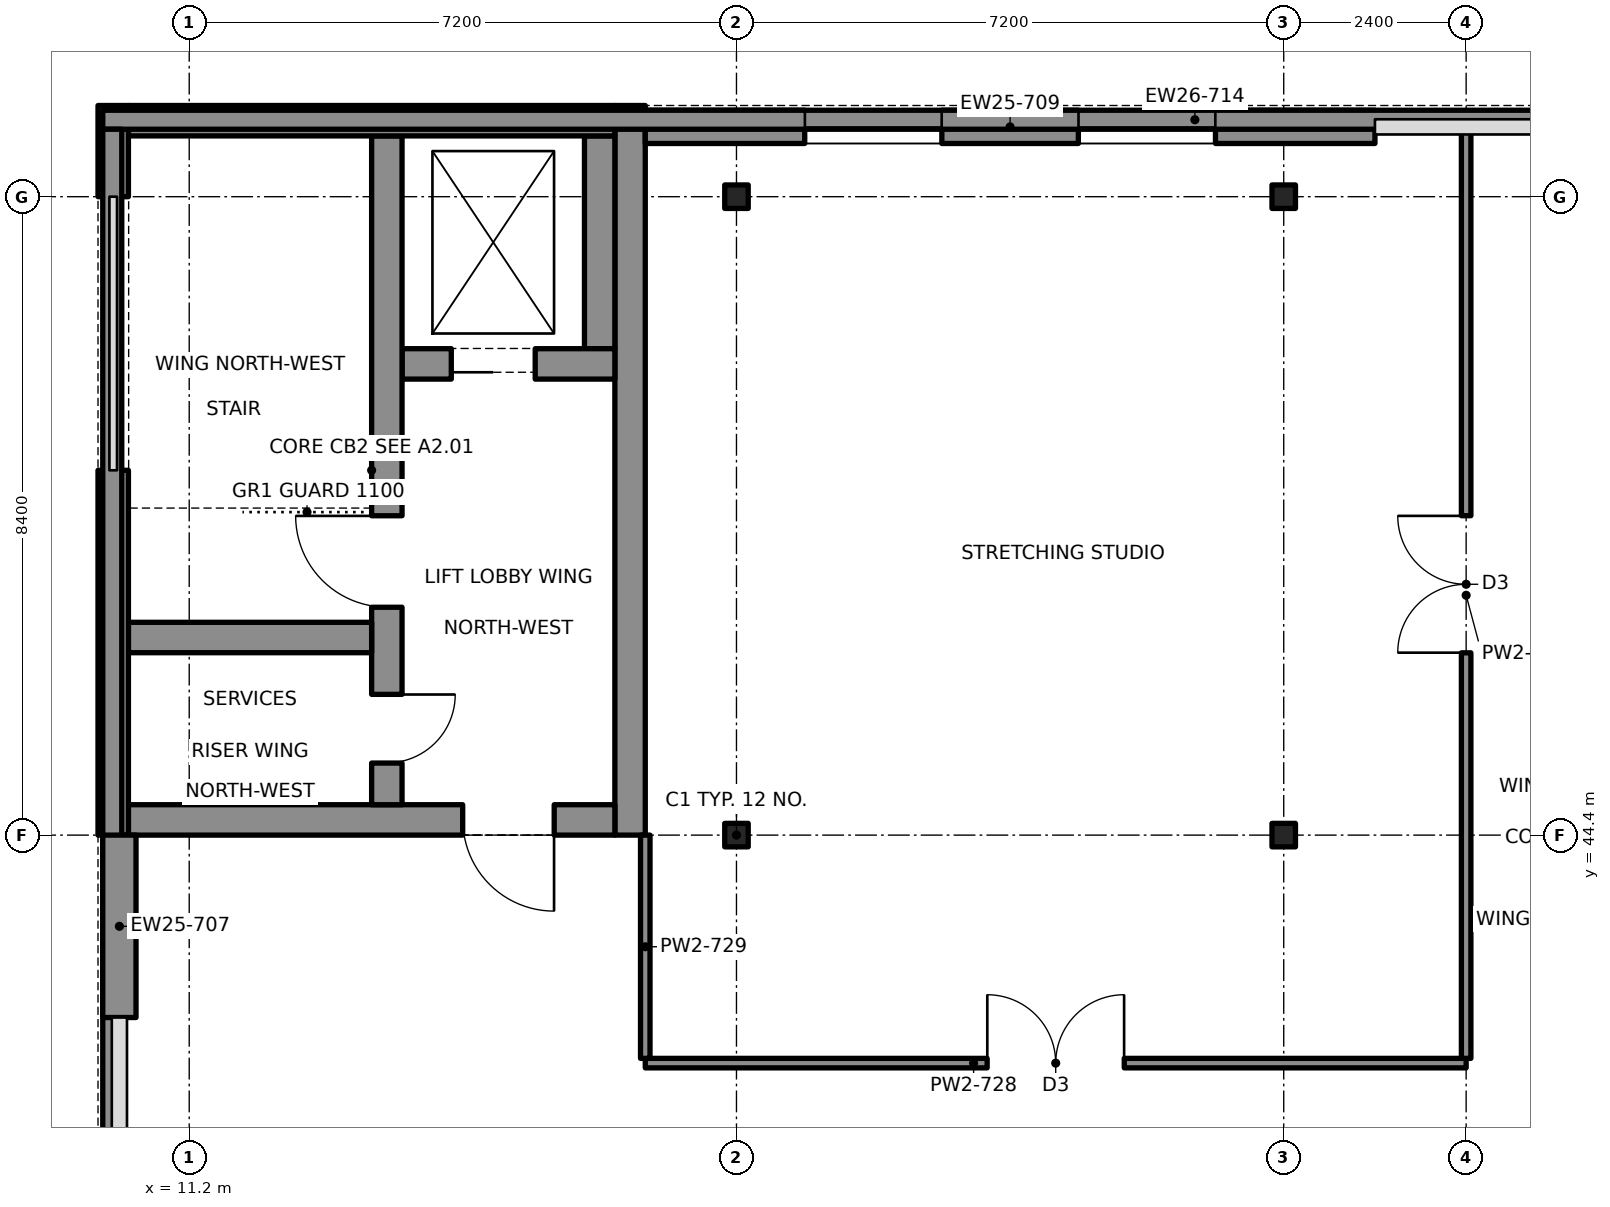
"""IFC4 building model, lengths in metres.
Left out: names, types, materials, properties, quantities, classifications, styles, units other than length and angle.
Written with IfcOpenShell. Run it as: python <this file> out.ifc"""

import sys

from ifc_helpers import new_model, si_unit, direction, frame, frame_2d, origin, origin_2d, place, context, subcontext, project, spatial, rectangle, i_section, extrude, element, fill, save


model = new_model("IFC4")
c1 = context("Model", 3, precision=1e-05, world=origin(), true_north=direction((0.0, 1.0)))
c2 = subcontext(c1, "Body", "Model", "MODEL_VIEW")
j1 = project(units=[si_unit("LENGTHUNIT", "METRE"), si_unit("PLANEANGLEUNIT", "RADIAN")], contexts=[c1])
p1 = place(None, origin())
s1 = spatial("IfcSite", under=j1, at=p1, CompositionType="ELEMENT")
p2 = place(p1, origin())
s2 = spatial("IfcBuilding", under=s1, at=p2, CompositionType="ELEMENT")
p3 = place(p2, frame((0.0, 0.0, 14.0)))
s3 = spatial("IfcBuildingStorey", under=s2, at=p3, CompositionType="ELEMENT", Elevation=14.0)
for number, where, z_axis, x_axis in (
    (1, (18.4, 44.4, 0.0), (0.0, 0.0, 1.0), (1.0, 0.0, 0.0)),
    (2, (18.4, 52.8, 0.0), (0.0, 0.0, 1.0), (1.0, 0.0, 0.0)),
    (3, (25.6, 44.4, 0.0), (0.0, 0.0, 1.0), (1.0, 0.0, 0.0)),
    (4, (25.6, 52.8, 0.0), (0.0, 0.0, 1.0), (1.0, 0.0, 0.0)),
):
    element("IfcColumn", number, at=place(p3, frame(where, z_axis=z_axis, x_axis=x_axis)), inside=s3, PredefinedType="COLUMN", context=c2, shape_type="SweptSolid", body=[
        extrude(i_section(OverallWidth=0.309, OverallDepth=0.323, WebThickness=0.014, FlangeThickness=0.023, at=origin_2d()), origin(), (0.0, 0.0, 1.0), 4.4),
    ])
p4 = place(p3, frame((17.2, 53.719, 0.0), z_axis=(0.0, 0.0, 1.0), x_axis=(1.0, 0.0, 0.0)))
e5 = element("IfcWall", 5, at=p4, inside=s3, PredefinedType="SOLIDWALL", context=c2, shape_type="SweptSolid", body=[
    extrude(rectangle(XDim=9.6, YDim=0.438, at=frame_2d((4.8, 0.0))), origin(), (0.0, 0.0, 1.0), 4.4),
])
p5 = place(p4, frame((2.1, 0.0, 0.75)))
e6 = element("IfcOpeningElement", 6, at=p5, cuts=e5, PredefinedType="OPENING", context=c2, shape_type="SweptSolid", body=[
    extrude(rectangle(XDim=1.8, YDim=2.8, at=frame_2d((0.9, 1.4))), frame((0.0, 0.229, 0.0), z_axis=(0.0, -1.0, 0.0), x_axis=(1.0, 0.0, 0.0)), (0.0, 0.0, 1.0), 0.458),
])
p6 = place(p4, frame((5.7, 0.0, 0.75)))
e7 = element("IfcOpeningElement", 7, at=p6, cuts=e5, PredefinedType="OPENING", context=c2, shape_type="SweptSolid", body=[
    extrude(rectangle(XDim=1.8, YDim=2.8, at=frame_2d((0.9, 1.4))), frame((0.0, 0.229, 0.0), z_axis=(0.0, -1.0, 0.0), x_axis=(1.0, 0.0, 0.0)), (0.0, 0.0, 1.0), 0.458),
])
p7 = place(p3, frame((10.281, 42.0, 0.0), z_axis=(0.0, 0.0, 1.0), x_axis=(0.0, 1.0, 0.0)))
e8 = element("IfcWall", 8, at=p7, inside=s3, PredefinedType="SOLIDWALL", context=c2, shape_type="SweptSolid", body=[
    extrude(rectangle(XDim=2.4, YDim=0.438, at=frame_2d((1.2, 0.0))), origin(), (0.0, 0.0, 1.0), 4.4),
])
p8 = place(p3, frame((10.062, 53.812, 4.4), z_axis=(0.0, 0.0, 1.0), x_axis=(1.0, 0.0, 0.0)))
e9 = element("IfcWall", 9, at=p8, inside=s3, PredefinedType="PARAPET", context=c2, shape_type="SweptSolid", body=[
    extrude(rectangle(XDim=28.738, YDim=0.25, at=frame_2d((14.369, 0.0))), origin(), (0.0, 0.0, 1.0), 1.1),
])
p9 = place(p3, frame((10.188, 18.312, 4.4), z_axis=(0.0, 0.0, 1.0), x_axis=(0.0, 1.0, 0.0)))
e10 = element("IfcWall", 10, at=p9, inside=s3, PredefinedType="PARAPET", context=c2, shape_type="SweptSolid", body=[
    extrude(rectangle(XDim=35.375, YDim=0.25, at=frame_2d((17.688, 0.0))), origin(), (0.0, 0.0, 1.0), 1.1),
])
p10 = place(p3, frame((10.2, 44.4, 0.0), z_axis=(0.0, 0.0, 1.0), x_axis=(0.0, 1.0, 0.0)))
e11 = element("IfcWall", 11, at=p10, inside=s3, PredefinedType="SHEAR", context=c2, shape_type="SweptSolid", body=[
    extrude(rectangle(XDim=4.8, YDim=0.4, at=frame_2d((2.4, 0.0))), origin(), (0.0, 0.0, 1.0), 4.2),
])
p11 = place(p3, frame((10.2, 52.8, 0.0), z_axis=(0.0, 0.0, 1.0), x_axis=(0.0, 1.0, 0.0)))
e12 = element("IfcWall", 12, at=p11, inside=s3, PredefinedType="SHEAR", context=c2, shape_type="SweptSolid", body=[
    extrude(rectangle(XDim=1.2, YDim=0.4, at=frame_2d((0.6, 0.0))), origin(), (0.0, 0.0, 1.0), 4.2),
])
p12 = place(p3, frame((17.0, 44.4, 0.0), z_axis=(0.0, 0.0, 1.0), x_axis=(0.0, 1.0, 0.0)))
e13 = element("IfcWall", 13, at=p12, inside=s3, PredefinedType="SHEAR", context=c2, shape_type="SweptSolid", body=[
    extrude(rectangle(XDim=9.6, YDim=0.4, at=frame_2d((4.8, 0.0))), origin(), (0.0, 0.0, 1.0), 4.2),
])
p13 = place(p3, frame((10.4, 53.8, 0.0), z_axis=(0.0, 0.0, 1.0), x_axis=(1.0, 0.0, 0.0)))
e14 = element("IfcWall", 14, at=p13, inside=s3, PredefinedType="SHEAR", context=c2, shape_type="SweptSolid", body=[
    extrude(rectangle(XDim=6.4, YDim=0.4, at=frame_2d((3.2, 0.0))), origin(), (0.0, 0.0, 1.0), 4.2),
])
p14 = place(p3, frame((10.4, 44.6, 0.0), z_axis=(0.0, 0.0, 1.0), x_axis=(1.0, 0.0, 0.0)))
e15 = element("IfcWall", 15, at=p14, inside=s3, PredefinedType="SHEAR", context=c2, shape_type="SweptSolid", body=[
    extrude(rectangle(XDim=6.4, YDim=0.4, at=frame_2d((3.2, 0.0))), origin(), (0.0, 0.0, 1.0), 4.2),
])
p15 = place(p14, frame((4.4, 0.0, 0.0)))
e16 = element("IfcOpeningElement", 16, at=p15, cuts=e15, PredefinedType="OPENING", context=c2, shape_type="SweptSolid", body=[
    extrude(rectangle(XDim=1.2, YDim=2.1, at=frame_2d((0.6, 1.05))), frame((0.0, 0.21, 0.0), z_axis=(0.0, -1.0, 0.0), x_axis=(1.0, 0.0, 0.0)), (0.0, 0.0, 1.0), 0.42),
])
p16 = place(p3, frame((13.8, 44.8, 0.0), z_axis=(0.0, 0.0, 1.0), x_axis=(0.0, 1.0, 0.0)))
e17 = element("IfcWall", 17, at=p16, inside=s3, PredefinedType="SHEAR", context=c2, shape_type="SweptSolid", body=[
    extrude(rectangle(XDim=8.8, YDim=0.4, at=frame_2d((4.4, 0.0))), origin(), (0.0, 0.0, 1.0), 4.2),
])
p17 = place(p16, frame((2.6, 0.0, 0.0)))
e18 = element("IfcOpeningElement", 18, at=p17, cuts=e17, PredefinedType="OPENING", context=c2, shape_type="SweptSolid", body=[
    extrude(rectangle(XDim=1.2, YDim=2.1, at=frame_2d((0.6, 1.05))), frame((0.0, 0.21, 0.0), z_axis=(0.0, -1.0, 0.0), x_axis=(1.0, 0.0, 0.0)), (0.0, 0.0, 1.0), 0.42),
])
p18 = place(p16, frame((0.55, 0.0, 0.0)))
e19 = element("IfcOpeningElement", 19, at=p18, cuts=e17, PredefinedType="OPENING", context=c2, shape_type="SweptSolid", body=[
    extrude(rectangle(XDim=0.9, YDim=2.1, at=frame_2d((0.45, 1.05))), frame((0.0, 0.21, 0.0), z_axis=(0.0, -1.0, 0.0), x_axis=(1.0, 0.0, 0.0)), (0.0, 0.0, 1.0), 0.42),
])
p19 = place(p3, frame((10.4, 47.0, 0.0), z_axis=(0.0, 0.0, 1.0), x_axis=(1.0, 0.0, 0.0)))
e20 = element("IfcWall", 20, at=p19, inside=s3, PredefinedType="SHEAR", context=c2, shape_type="SweptSolid", body=[
    extrude(rectangle(XDim=3.2, YDim=0.4, at=frame_2d((1.6, 0.0))), origin(), (0.0, 0.0, 1.0), 4.2),
])
p20 = place(p3, frame((14.0, 50.6, 0.0), z_axis=(0.0, 0.0, 1.0), x_axis=(1.0, 0.0, 0.0)))
e21 = element("IfcWall", 21, at=p20, inside=s3, PredefinedType="SHEAR", context=c2, shape_type="SweptSolid", body=[
    extrude(rectangle(XDim=2.8, YDim=0.4, at=frame_2d((1.4, 0.0))), origin(), (0.0, 0.0, 1.0), 4.2),
])
p21 = place(p20, frame((0.65, 0.0, 0.0)))
e22 = element("IfcOpeningElement", 22, at=p21, cuts=e21, PredefinedType="OPENING", context=c2, shape_type="SweptSolid", body=[
    extrude(rectangle(XDim=1.1, YDim=2.1, at=frame_2d((0.55, 1.05))), frame((0.0, 0.21, 0.0), z_axis=(0.0, -1.0, 0.0), x_axis=(1.0, 0.0, 0.0)), (0.0, 0.0, 1.0), 0.42),
])
p22 = place(p3, frame((16.6, 50.8, 0.0), z_axis=(0.0, 0.0, 1.0), x_axis=(0.0, 1.0, 0.0)))
e23 = element("IfcWall", 23, at=p22, inside=s3, PredefinedType="SHEAR", context=c2, shape_type="SweptSolid", body=[
    extrude(rectangle(XDim=2.8, YDim=0.4, at=frame_2d((1.4, 0.0))), origin(), (0.0, 0.0, 1.0), 4.2),
])
p23 = place(p3, frame((17.2, 41.4, 0.0), z_axis=(0.0, 0.0, 1.0), x_axis=(1.0, 0.0, 0.0)))
e24 = element("IfcWall", 24, at=p23, inside=s3, PredefinedType="PARTITIONING", context=c2, shape_type="SweptSolid", body=[
    extrude(rectangle(XDim=10.8, YDim=0.125, at=frame_2d((5.4, 0.0))), origin(), (0.0, 0.0, 1.0), 3.65),
])
p24 = place(p23, frame((4.5, 0.0, 0.0)))
e25 = element("IfcOpeningElement", 25, at=p24, cuts=e24, PredefinedType="OPENING", context=c2, shape_type="SweptSolid", body=[
    extrude(rectangle(XDim=1.8, YDim=2.1, at=frame_2d((0.9, 1.05))), frame((0.0, 0.073, 0.0), z_axis=(0.0, -1.0, 0.0), x_axis=(1.0, 0.0, 0.0)), (0.0, 0.0, 1.0), 0.145),
])
p25 = place(p3, frame((17.2, 41.462, 0.0), z_axis=(0.0, 0.0, 1.0), x_axis=(0.0, 1.0, 0.0)))
e26 = element("IfcWall", 26, at=p25, inside=s3, PredefinedType="PARTITIONING", context=c2, shape_type="SweptSolid", body=[
    extrude(rectangle(XDim=2.938, YDim=0.125, at=frame_2d((1.469, 0.0))), origin(), (0.0, 0.0, 1.0), 3.65),
])
p26 = place(p3, frame((28.0, 41.462, 0.0), z_axis=(0.0, 0.0, 1.0), x_axis=(0.0, 1.0, 0.0)))
e27 = element("IfcWall", 27, at=p26, inside=s3, PredefinedType="PARTITIONING", context=c2, shape_type="SweptSolid", body=[
    extrude(rectangle(XDim=12.186, YDim=0.125, at=frame_2d((6.093, 0.0))), origin(), (0.0, 0.0, 1.0), 3.65),
])
p27 = place(p26, frame((5.338, 0.0, 0.0)))
e28 = element("IfcOpeningElement", 28, at=p27, cuts=e27, PredefinedType="OPENING", context=c2, shape_type="SweptSolid", body=[
    extrude(rectangle(XDim=1.8, YDim=2.1, at=frame_2d((0.9, 1.05))), frame((0.0, 0.073, 0.0), z_axis=(0.0, -1.0, 0.0), x_axis=(1.0, 0.0, 0.0)), (0.0, 0.0, 1.0), 0.145),
])
p28 = place(p5, origin())
e29 = element("IfcWindow", 29, at=p28, inside=s3, PartitioningType="SINGLE_PANEL", PredefinedType="WINDOW", context=c2, shape_type="SweptSolid", body=[
    extrude(rectangle(XDim=1.8, YDim=2.8, at=frame_2d((0.9, 1.4))), frame((0.0, 0.03, 0.0), z_axis=(0.0, -1.0, 0.0), x_axis=(1.0, 0.0, 0.0)), (0.0, 0.0, 1.0), 0.06),
])
fill(e6, e29)
p29 = place(p6, origin())
e30 = element("IfcWindow", 30, at=p29, inside=s3, PartitioningType="SINGLE_PANEL", PredefinedType="WINDOW", context=c2, shape_type="SweptSolid", body=[
    extrude(rectangle(XDim=1.8, YDim=2.8, at=frame_2d((0.9, 1.4))), frame((0.0, 0.03, 0.0), z_axis=(0.0, -1.0, 0.0), x_axis=(1.0, 0.0, 0.0)), (0.0, 0.0, 1.0), 0.06),
])
fill(e7, e30)
p30 = place(p15, origin())
e31 = element("IfcDoor", 31, at=p30, inside=s3, OperationType="SINGLE_SWING_RIGHT", PredefinedType="DOOR", context=c2, shape_type="SweptSolid", body=[
    extrude(rectangle(XDim=1.2, YDim=2.1, at=frame_2d((0.6, 1.05))), frame((0.0, 0.025, 0.0), z_axis=(0.0, -1.0, 0.0), x_axis=(1.0, 0.0, 0.0)), (0.0, 0.0, 1.0), 0.05),
])
fill(e16, e31)
p31 = place(p17, origin())
e32 = element("IfcDoor", 32, at=p31, inside=s3, OperationType="SINGLE_SWING_RIGHT", PredefinedType="DOOR", context=c2, shape_type="SweptSolid", body=[
    extrude(rectangle(XDim=1.2, YDim=2.1, at=frame_2d((0.6, 1.05))), frame((0.0, 0.025, 0.0), z_axis=(0.0, -1.0, 0.0), x_axis=(1.0, 0.0, 0.0)), (0.0, 0.0, 1.0), 0.05),
])
fill(e18, e32)
p32 = place(p18, origin())
e33 = element("IfcDoor", 33, at=p32, inside=s3, OperationType="SINGLE_SWING_RIGHT", PredefinedType="DOOR", context=c2, shape_type="SweptSolid", body=[
    extrude(rectangle(XDim=0.9, YDim=2.1, at=frame_2d((0.45, 1.05))), frame((0.0, 0.025, 0.0), z_axis=(0.0, -1.0, 0.0), x_axis=(1.0, 0.0, 0.0)), (0.0, 0.0, 1.0), 0.05),
])
fill(e19, e33)
p33 = place(p21, origin())
e34 = element("IfcDoor", 34, at=p33, inside=s3, OperationType="SLIDING_TO_RIGHT", PredefinedType="DOOR", context=c2, shape_type="SweptSolid", body=[
    extrude(rectangle(XDim=1.1, YDim=2.1, at=frame_2d((0.55, 1.05))), frame((0.0, 0.025, 0.0), z_axis=(0.0, -1.0, 0.0), x_axis=(1.0, 0.0, 0.0)), (0.0, 0.0, 1.0), 0.05),
])
fill(e22, e34)
p34 = place(p27, origin())
e35 = element("IfcDoor", 35, at=p34, inside=s3, OperationType="DOUBLE_DOOR_SINGLE_SWING", PredefinedType="DOOR", context=c2, shape_type="SweptSolid", body=[
    extrude(rectangle(XDim=1.8, YDim=2.1, at=frame_2d((0.9, 1.05))), frame((0.0, 0.025, 0.0), z_axis=(0.0, -1.0, 0.0), x_axis=(1.0, 0.0, 0.0)), (0.0, 0.0, 1.0), 0.05),
])
fill(e28, e35)
p35 = place(p24, origin())
e36 = element("IfcDoor", 36, at=p35, inside=s3, OperationType="DOUBLE_DOOR_SINGLE_SWING", PredefinedType="DOOR", context=c2, shape_type="SweptSolid", body=[
    extrude(rectangle(XDim=1.8, YDim=2.1, at=frame_2d((0.9, 1.05))), frame((0.0, 0.025, 0.0), z_axis=(0.0, -1.0, 0.0), x_axis=(1.0, 0.0, 0.0)), (0.0, 0.0, 1.0), 0.05),
])
fill(e25, e36)
save(model, sys.argv[1])
